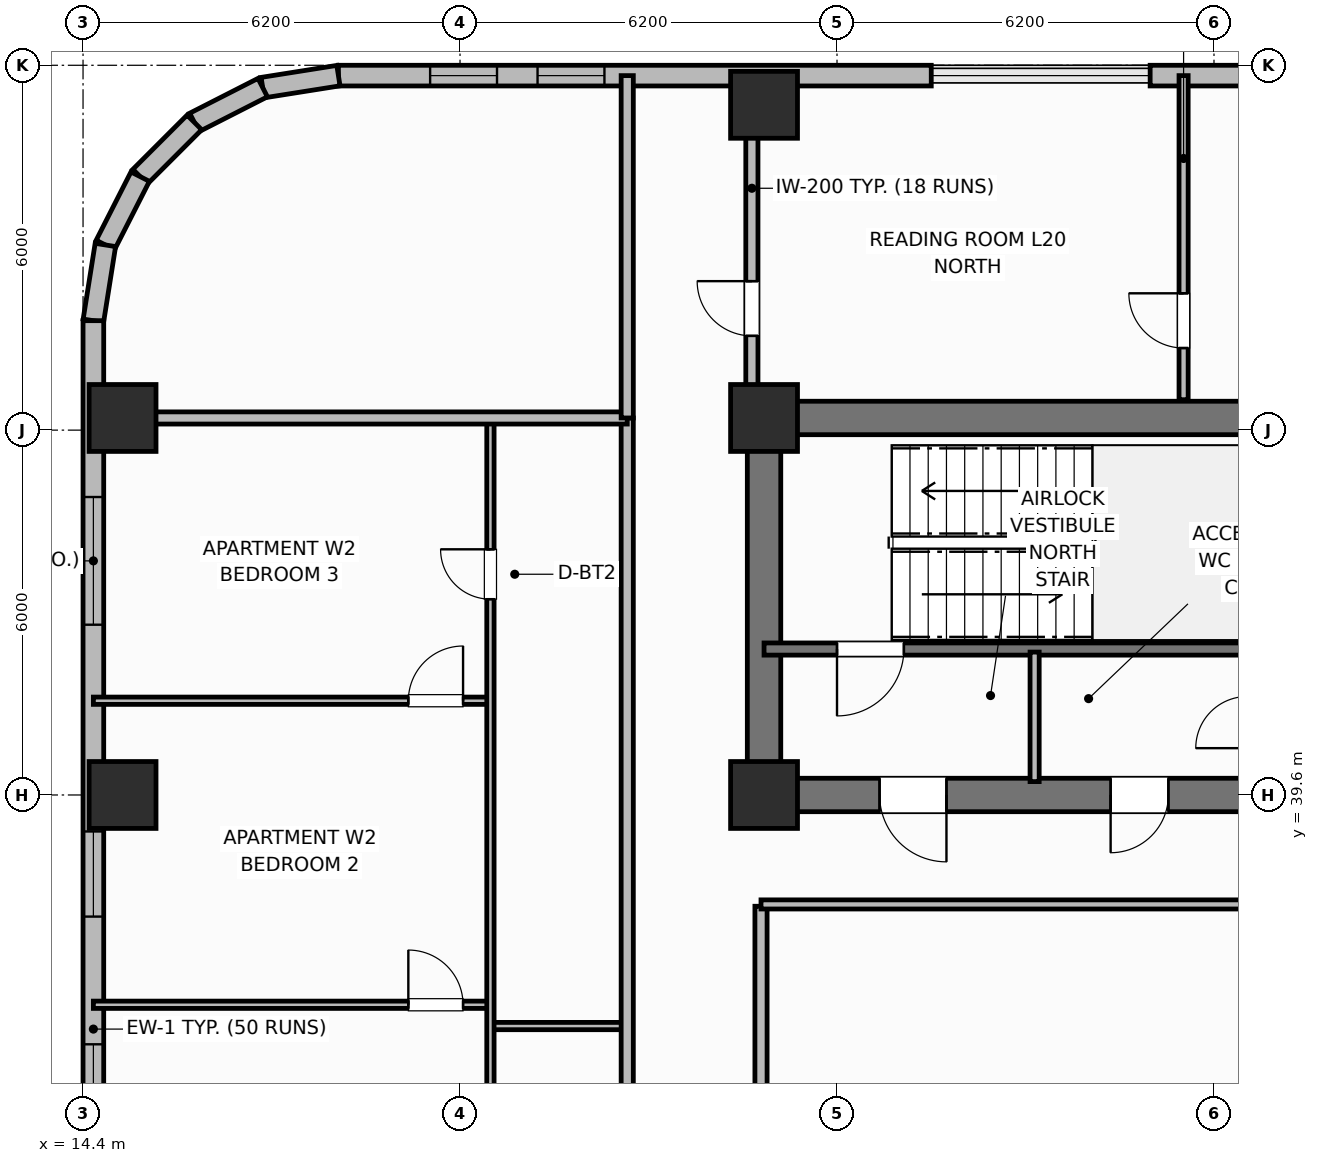
"""IFC4 building model, lengths in metres.
Left out: names, types, materials, properties, quantities, classifications, styles, units other than length and angle.
Written with IfcOpenShell. Run it as: python <this file> out.ifc"""

import sys

from ifc_helpers import new_model, si_unit, direction, frame, frame_2d, origin, origin_2d, place, context, subcontext, project, spatial, rectangle, extrude, element, fill, save


model = new_model("IFC4")
c1 = context("Model", 3, precision=1e-05, world=origin(), true_north=direction((0.0, 1.0)))
c2 = subcontext(c1, "Body", "Model", "MODEL_VIEW")
j1 = project(units=[si_unit("LENGTHUNIT", "METRE"), si_unit("PLANEANGLEUNIT", "RADIAN")], contexts=[c1])
p1 = place(None, origin())
s1 = spatial("IfcSite", under=j1, at=p1, CompositionType="ELEMENT")
p2 = place(p1, origin())
s2 = spatial("IfcBuilding", under=s1, at=p2, CompositionType="ELEMENT")
p3 = place(p2, frame((0.0, 0.0, 84.1)))
s3 = spatial("IfcBuildingStorey", under=s2, at=p3, CompositionType="ELEMENT", Elevation=84.1)
p4 = place(p3, frame((25.6, 45.8, 0.0), z_axis=(0.0, 0.0, 1.0), x_axis=(1.0, 0.0, 0.0)))
e1 = element("IfcWall", 1, at=p4, inside=s3, PredefinedType="SHEAR", context=c2, shape_type="SweptSolid", body=[
    extrude(rectangle(XDim=27.2, YDim=0.55, at=frame_2d((13.6, 0.0))), origin(), (0.0, 0.0, 1.0), 4.2),
])
p5 = place(p3, frame((25.6, 39.875, 0.0), z_axis=(0.0, 0.0, 1.0), x_axis=(0.0, 1.0, 0.0)))
e2 = element("IfcWall", 2, at=p5, inside=s3, PredefinedType="SHEAR", context=c2, shape_type="SweptSolid", body=[
    extrude(rectangle(XDim=5.65, YDim=0.55, at=frame_2d((2.825, 0.0))), origin(), (0.0, 0.0, 1.0), 4.2),
])
p6 = place(p3, frame((52.8, 39.6, 0.0), z_axis=(0.0, 0.0, 1.0), x_axis=(-1.0, 0.0, 0.0)))
e3 = element("IfcWall", 3, at=p6, inside=s3, PredefinedType="SHEAR", context=c2, shape_type="SweptSolid", body=[
    extrude(rectangle(XDim=27.2, YDim=0.55, at=frame_2d((13.6, 0.0))), origin(), (0.0, 0.0, 1.0), 4.2),
])
p7 = place(p6, frame((24.2, 0.0, 0.0)))
e4 = element("IfcOpeningElement", 4, at=p7, cuts=e3, PredefinedType="OPENING", context=c2, shape_type="SweptSolid", body=[
    extrude(rectangle(XDim=1.1, YDim=2.15, at=frame_2d((0.55, 1.075))), frame((0.0, 0.285, 0.0), z_axis=(0.0, -1.0, 0.0), x_axis=(1.0, 0.0, 0.0)), (0.0, 0.0, 1.0), 0.57),
])
p8 = place(p6, frame((20.55, 0.0, 0.0)))
e5 = element("IfcOpeningElement", 5, at=p8, cuts=e3, PredefinedType="OPENING", context=c2, shape_type="SweptSolid", body=[
    extrude(rectangle(XDim=0.95, YDim=2.1, at=frame_2d((0.475, 1.05))), frame((0.0, 0.285, 0.0), z_axis=(0.0, -1.0, 0.0), x_axis=(1.0, 0.0, 0.0)), (0.0, 0.0, 1.0), 0.57),
])
p9 = place(p6, frame((15.1, 0.0, 0.0)))
e6 = element("IfcOpeningElement", 6, at=p9, cuts=e3, PredefinedType="OPENING", context=c2, shape_type="SweptSolid", body=[
    extrude(rectangle(XDim=1.2, YDim=2.15, at=frame_2d((0.6, 1.075))), frame((0.0, 0.285, 0.0), z_axis=(0.0, -1.0, 0.0), x_axis=(1.0, 0.0, 0.0)), (0.0, 0.0, 1.0), 0.57),
])
p10 = place(p6, frame((11.3, 0.0, 0.0)))
e7 = element("IfcOpeningElement", 7, at=p10, cuts=e3, PredefinedType="OPENING", context=c2, shape_type="SweptSolid", body=[
    extrude(rectangle(XDim=1.3, YDim=2.2, at=frame_2d((0.65, 1.1))), frame((0.0, 0.285, 0.0), z_axis=(0.0, -1.0, 0.0), x_axis=(1.0, 0.0, 0.0)), (0.0, 0.0, 1.0), 0.57),
])
p11 = place(p6, frame((7.25, 0.0, 0.0)))
e8 = element("IfcOpeningElement", 8, at=p11, cuts=e3, PredefinedType="OPENING", context=c2, shape_type="SweptSolid", body=[
    extrude(rectangle(XDim=0.85, YDim=2.1, at=frame_2d((0.425, 1.05))), frame((0.0, 0.285, 0.0), z_axis=(0.0, -1.0, 0.0), x_axis=(1.0, 0.0, 0.0)), (0.0, 0.0, 1.0), 0.57),
])
p12 = place(p6, frame((3.0, 0.0, 0.0)))
e9 = element("IfcOpeningElement", 9, at=p12, cuts=e3, PredefinedType="OPENING", context=c2, shape_type="SweptSolid", body=[
    extrude(rectangle(XDim=0.9, YDim=2.1, at=frame_2d((0.45, 1.05))), frame((0.0, 0.285, 0.0), z_axis=(0.0, -1.0, 0.0), x_axis=(1.0, 0.0, 0.0)), (0.0, 0.0, 1.0), 0.57),
])
for number, where, z_axis, x_axis in (
    (10, (25.6, 39.6, 0.0), (0.0, 0.0, 1.0), (1.0, 0.0, 0.0)),
    (11, (25.6, 45.8, 0.0), (0.0, 0.0, 1.0), (1.0, 0.0, 0.0)),
    (12, (25.6, 50.95, 0.0), (0.0, 0.0, 1.0), (1.0, 0.0, 0.0)),
    (13, (15.05, 39.6, 0.0), (0.0, 0.0, 1.0), (1.0, 0.0, 0.0)),
    (14, (15.05, 45.8, 0.0), (0.0, 0.0, 1.0), (1.0, 0.0, 0.0)),
):
    element("IfcColumn", number, at=place(p3, frame(where, z_axis=z_axis, x_axis=x_axis)), inside=s3, PredefinedType="COLUMN", context=c2, shape_type="SweptSolid", body=[
        extrude(rectangle(XDim=1.1, YDim=1.1, at=origin_2d()), origin(), (0.0, 0.0, 1.0), 4.2),
    ])
p13 = place(p3, frame((36.0, 51.43, 0.0), z_axis=(0.0, 0.0, 1.0), x_axis=(-1.0, 0.0, 0.0)))
e15 = element("IfcWall", 15, at=p13, inside=s3, PredefinedType="SOLIDWALL", context=c2, shape_type="SweptSolid", body=[
    extrude(rectangle(XDim=4.05, YDim=0.34, at=frame_2d((2.025, 0.0))), origin(), (0.0, 0.0, 1.0), 3.2),
])
p14 = place(p3, frame((28.35, 51.43, 0.0), z_axis=(0.0, 0.0, 1.0), x_axis=(-1.0, 0.0, 0.0)))
e16 = element("IfcWall", 16, at=p14, inside=s3, PredefinedType="SOLIDWALL", context=c2, shape_type="SweptSolid", body=[
    extrude(rectangle(XDim=9.75, YDim=0.34, at=frame_2d((4.875, 0.0))), origin(), (0.0, 0.0, 1.0), 3.2),
])
p15 = place(p14, frame((5.375, 0.0, 0.95)))
e17 = element("IfcOpeningElement", 17, at=p15, cuts=e16, PredefinedType="OPENING", context=c2, shape_type="SweptSolid", body=[
    extrude(rectangle(XDim=1.1, YDim=1.65, at=frame_2d((0.55, 0.825))), frame((0.0, 0.18, 0.0), z_axis=(0.0, -1.0, 0.0), x_axis=(1.0, 0.0, 0.0)), (0.0, 0.0, 1.0), 0.36),
])
p16 = place(p14, frame((7.142, 0.0, 0.95)))
e18 = element("IfcOpeningElement", 18, at=p16, cuts=e16, PredefinedType="OPENING", context=c2, shape_type="SweptSolid", body=[
    extrude(rectangle(XDim=1.1, YDim=1.65, at=frame_2d((0.55, 0.825))), frame((0.0, 0.18, 0.0), z_axis=(0.0, -1.0, 0.0), x_axis=(1.0, 0.0, 0.0)), (0.0, 0.0, 1.0), 0.36),
])
p17 = place(p3, frame((18.6, 51.43, 0.0), z_axis=(0.0, 0.0, 1.0), x_axis=(-0.98771582066, -0.156260864002, 0.0)))
e19 = element("IfcWall", 19, at=p17, inside=s3, PredefinedType="SOLIDWALL", context=c2, shape_type="SweptSolid", body=[
    extrude(rectangle(XDim=1.261, YDim=0.34, at=frame_2d((0.63, 0.0))), origin(), (0.0, 0.0, 1.0), 3.2),
])
for number, where, z_axis, x_axis in (
    (20, (17.355, 51.233, 0.0), (0.0, 0.0, 1.0), (-0.891, -0.454, 0.0)),
    (21, (16.231, 50.66, 0.0), (0.0, 0.0, 1.0), (-0.707, -0.707, 0.0)),
    (22, (15.34, 49.769, 0.0), (0.0, 0.0, 1.0), (-0.454, -0.891, 0.0)),
):
    element("IfcWall", number, at=place(p3, frame(where, z_axis=z_axis, x_axis=x_axis)), inside=s3, PredefinedType="SOLIDWALL", context=c2, shape_type="SweptSolid", body=[
        extrude(rectangle(XDim=1.261, YDim=0.34, at=frame_2d((0.63, 0.0))), origin(), (0.0, 0.0, 1.0), 3.2),
    ])
p18 = place(p3, frame((14.767, 48.645, 0.0), z_axis=(0.0, 0.0, 1.0), x_axis=(-0.156260864002, -0.98771582066, 0.0)))
e23 = element("IfcWall", 23, at=p18, inside=s3, PredefinedType="SOLIDWALL", context=c2, shape_type="SweptSolid", body=[
    extrude(rectangle(XDim=1.261, YDim=0.34, at=frame_2d((0.63, 0.0))), origin(), (0.0, 0.0, 1.0), 3.2),
])
p19 = place(p3, frame((14.57, 47.4, 0.0), z_axis=(0.0, 0.0, 1.0), x_axis=(0.0, -1.0, 0.0)))
e24 = element("IfcWall", 24, at=p19, inside=s3, PredefinedType="SOLIDWALL", context=c2, shape_type="SweptSolid", body=[
    extrude(rectangle(XDim=14.8, YDim=0.34, at=frame_2d((7.4, 0.0))), origin(), (0.0, 0.0, 1.0), 3.2),
])
p20 = place(p19, frame((2.9, 0.0, 0.8)))
e25 = element("IfcOpeningElement", 25, at=p20, cuts=e24, PredefinedType="OPENING", context=c2, shape_type="SweptSolid", body=[
    extrude(rectangle(XDim=2.1, YDim=1.9, at=frame_2d((1.05, 0.95))), frame((0.0, 0.18, 0.0), z_axis=(0.0, -1.0, 0.0), x_axis=(1.0, 0.0, 0.0)), (0.0, 0.0, 1.0), 0.36),
])
p21 = place(p19, frame((8.4, 0.0, 0.85)))
e26 = element("IfcOpeningElement", 26, at=p21, cuts=e24, PredefinedType="OPENING", context=c2, shape_type="SweptSolid", body=[
    extrude(rectangle(XDim=1.4, YDim=1.85, at=frame_2d((0.7, 0.925))), frame((0.0, 0.18, 0.0), z_axis=(0.0, -1.0, 0.0), x_axis=(1.0, 0.0, 0.0)), (0.0, 0.0, 1.0), 0.36),
])
p22 = place(p19, frame((11.9, 0.0, 0.8)))
e27 = element("IfcOpeningElement", 27, at=p22, cuts=e24, PredefinedType="OPENING", context=c2, shape_type="SweptSolid", body=[
    extrude(rectangle(XDim=2.1, YDim=1.9, at=frame_2d((1.05, 0.95))), frame((0.0, 0.18, 0.0), z_axis=(0.0, -1.0, 0.0), x_axis=(1.0, 0.0, 0.0)), (0.0, 0.0, 1.0), 0.36),
])
p23 = place(p3, frame((35.15, 42.0, 0.0), z_axis=(0.0, 0.0, 1.0), x_axis=(-1.0, 0.0, 0.0)))
e28 = element("IfcWall", 28, at=p23, inside=s3, PredefinedType="SHEAR", context=c2, shape_type="SweptSolid", body=[
    extrude(rectangle(XDim=9.55, YDim=0.2, at=frame_2d((4.775, 0.0))), origin(), (0.0, 0.0, 1.0), 4.2),
])
p24 = place(p23, frame((7.25, 0.0, 0.0)))
e29 = element("IfcOpeningElement", 29, at=p24, cuts=e28, PredefinedType="OPENING", context=c2, shape_type="SweptSolid", body=[
    extrude(rectangle(XDim=1.1, YDim=2.15, at=frame_2d((0.55, 1.075))), frame((0.0, 0.11, 0.0), z_axis=(0.0, -1.0, 0.0), x_axis=(1.0, 0.0, 0.0)), (0.0, 0.0, 1.0), 0.22),
])
p25 = place(p3, frame((30.05, 39.82, 0.0), z_axis=(0.0, 0.0, 1.0), x_axis=(0.0, 1.0, 0.0)))
e30 = element("IfcWall", 30, at=p25, inside=s3, PredefinedType="PARTITIONING", context=c2, shape_type="SweptSolid", body=[
    extrude(rectangle(XDim=2.13, YDim=0.15, at=frame_2d((1.065, 0.0))), origin(), (0.0, 0.0, 1.0), 3.03),
])
p26 = place(p3, frame((25.55, 18.63, 0.0), z_axis=(0.0, 0.0, 1.0), x_axis=(0.0, 1.0, 0.0)))
e31 = element("IfcWall", 31, at=p26, inside=s3, PredefinedType="PARTITIONING", context=c2, shape_type="SweptSolid", body=[
    extrude(rectangle(XDim=19.14, YDim=0.2, at=frame_2d((9.57, 0.0))), origin(), (0.0, 0.0, 1.0), 3.03),
])
p27 = place(p3, frame((25.55, 37.8, 0.0), z_axis=(0.0, 0.0, 1.0), x_axis=(1.0, 0.0, 0.0)))
e32 = element("IfcWall", 32, at=p27, inside=s3, PredefinedType="PARTITIONING", context=c2, shape_type="SweptSolid", body=[
    extrude(rectangle(XDim=12.5, YDim=0.15, at=frame_2d((6.25, 0.0))), origin(), (0.0, 0.0, 1.0), 3.03),
])
p28 = place(p3, frame((21.1, 35.8, 0.0), z_axis=(0.0, 0.0, 1.0), x_axis=(1.0, 0.0, 0.0)))
e33 = element("IfcWall", 33, at=p28, inside=s3, PredefinedType="PARTITIONING", context=c2, shape_type="SweptSolid", body=[
    extrude(rectangle(XDim=2.25, YDim=0.12, at=frame_2d((1.125, 0.0))), origin(), (0.0, 0.0, 1.0), 3.03),
])
p29 = place(p3, frame((14.57, 36.15, 0.0), z_axis=(0.0, 0.0, 1.0), x_axis=(1.0, 0.0, 0.0)))
e34 = element("IfcWall", 34, at=p29, inside=s3, PredefinedType="PARTITIONING", context=c2, shape_type="SweptSolid", body=[
    extrude(rectangle(XDim=6.53, YDim=0.12, at=frame_2d((3.265, 0.0))), origin(), (0.0, 0.0, 1.0), 3.03),
])
p30 = place(p29, frame((5.18, 0.0, 0.0)))
e35 = element("IfcOpeningElement", 35, at=p30, cuts=e34, PredefinedType="OPENING", context=c2, shape_type="SweptSolid", body=[
    extrude(rectangle(XDim=0.9, YDim=2.1, at=frame_2d((0.45, 1.05))), frame((0.0, 0.07, 0.0), z_axis=(0.0, -1.0, 0.0), x_axis=(1.0, 0.0, 0.0)), (0.0, 0.0, 1.0), 0.14),
])
p31 = place(p3, frame((14.57, 41.15, 0.0), z_axis=(0.0, 0.0, 1.0), x_axis=(1.0, 0.0, 0.0)))
e36 = element("IfcWall", 36, at=p31, inside=s3, PredefinedType="PARTITIONING", context=c2, shape_type="SweptSolid", body=[
    extrude(rectangle(XDim=6.53, YDim=0.12, at=frame_2d((3.265, 0.0))), origin(), (0.0, 0.0, 1.0), 3.03),
])
p32 = place(p31, frame((5.18, 0.0, 0.0)))
e37 = element("IfcOpeningElement", 37, at=p32, cuts=e36, PredefinedType="OPENING", context=c2, shape_type="SweptSolid", body=[
    extrude(rectangle(XDim=0.9, YDim=2.1, at=frame_2d((0.45, 1.05))), frame((0.0, 0.07, 0.0), z_axis=(0.0, -1.0, 0.0), x_axis=(1.0, 0.0, 0.0)), (0.0, 0.0, 1.0), 0.14),
])
p33 = place(p3, frame((21.1, 26.64, 0.0), z_axis=(0.0, 0.0, 1.0), x_axis=(0.0, 1.0, 0.0)))
e38 = element("IfcWall", 38, at=p33, inside=s3, PredefinedType="PARTITIONING", context=c2, shape_type="SweptSolid", body=[
    extrude(rectangle(XDim=19.12, YDim=0.12, at=frame_2d((9.56, 0.0))), origin(), (0.0, 0.0, 1.0), 3.03),
])
p34 = place(p33, frame((2.81, 0.0, 0.0)))
e39 = element("IfcOpeningElement", 39, at=p34, cuts=e38, PredefinedType="OPENING", context=c2, shape_type="SweptSolid", body=[
    extrude(rectangle(XDim=0.9, YDim=2.1, at=frame_2d((0.45, 1.05))), frame((0.0, 0.07, 0.0), z_axis=(0.0, -1.0, 0.0), x_axis=(1.0, 0.0, 0.0)), (0.0, 0.0, 1.0), 0.14),
])
p35 = place(p33, frame((16.18, 0.0, 0.0)))
e40 = element("IfcOpeningElement", 40, at=p35, cuts=e38, PredefinedType="OPENING", context=c2, shape_type="SweptSolid", body=[
    extrude(rectangle(XDim=0.82, YDim=2.08, at=frame_2d((0.41, 1.04))), frame((0.0, 0.07, 0.0), z_axis=(0.0, -1.0, 0.0), x_axis=(1.0, 0.0, 0.0)), (0.0, 0.0, 1.0), 0.14),
])
p36 = place(p3, frame((23.35, 10.6, 0.0), z_axis=(0.0, 0.0, 1.0), x_axis=(0.0, 1.0, 0.0)))
e41 = element("IfcWall", 41, at=p36, inside=s3, PredefinedType="PARTITIONING", context=c2, shape_type="SweptSolid", body=[
    extrude(rectangle(XDim=35.2, YDim=0.2, at=frame_2d((17.6, 0.0))), origin(), (0.0, 0.0, 1.0), 3.03),
])
p37 = place(p36, frame((2.65, 0.0, 0.0)))
e42 = element("IfcOpeningElement", 42, at=p37, cuts=e41, PredefinedType="OPENING", context=c2, shape_type="SweptSolid", body=[
    extrude(rectangle(XDim=1.0, YDim=2.15, at=frame_2d((0.5, 1.075))), frame((0.0, 0.11, 0.0), z_axis=(0.0, -1.0, 0.0), x_axis=(1.0, 0.0, 0.0)), (0.0, 0.0, 1.0), 0.22),
])
p38 = place(p36, frame((19.95, 0.0, 0.0)))
e43 = element("IfcOpeningElement", 43, at=p38, cuts=e41, PredefinedType="OPENING", context=c2, shape_type="SweptSolid", body=[
    extrude(rectangle(XDim=1.0, YDim=2.15, at=frame_2d((0.5, 1.075))), frame((0.0, 0.11, 0.0), z_axis=(0.0, -1.0, 0.0), x_axis=(1.0, 0.0, 0.0)), (0.0, 0.0, 1.0), 0.22),
])
p39 = place(p3, frame((14.99, 45.8, 0.0), z_axis=(0.0, 0.0, 1.0), x_axis=(1.0, 0.0, 0.0)))
e44 = element("IfcWall", 44, at=p39, inside=s3, PredefinedType="PARTITIONING", context=c2, shape_type="SweptSolid", body=[
    extrude(rectangle(XDim=8.36, YDim=0.2, at=frame_2d((4.18, 0.0))), origin(), (0.0, 0.0, 1.0), 3.03),
])
p40 = place(p3, frame((23.35, 45.8, 0.0), z_axis=(0.0, 0.0, 1.0), x_axis=(0.0, 1.0, 0.0)))
e45 = element("IfcWall", 45, at=p40, inside=s3, PredefinedType="PARTITIONING", context=c2, shape_type="SweptSolid", body=[
    extrude(rectangle(XDim=5.63, YDim=0.2, at=frame_2d((2.815, 0.0))), origin(), (0.0, 0.0, 1.0), 3.03),
])
p41 = place(p3, frame((32.5, 46.1, 0.0), z_axis=(0.0, 0.0, 1.0), x_axis=(0.0, 1.0, 0.0)))
e46 = element("IfcWall", 46, at=p41, inside=s3, PredefinedType="PARTITIONING", context=c2, shape_type="SweptSolid", body=[
    extrude(rectangle(XDim=5.33, YDim=0.15, at=frame_2d((2.665, 0.0))), origin(), (0.0, 0.0, 1.0), 3.03),
])
p42 = place(p41, frame((0.85, 0.0, 0.0)))
e47 = element("IfcOpeningElement", 47, at=p42, cuts=e46, PredefinedType="OPENING", context=c2, shape_type="SweptSolid", body=[
    extrude(rectangle(XDim=0.9, YDim=2.1, at=frame_2d((0.45, 1.05))), frame((0.0, 0.085, 0.0), z_axis=(0.0, -1.0, 0.0), x_axis=(1.0, 0.0, 0.0)), (0.0, 0.0, 1.0), 0.17),
])
p43 = place(p3, frame((25.4, 46.1, 0.0), z_axis=(0.0, 0.0, 1.0), x_axis=(0.0, 1.0, 0.0)))
e48 = element("IfcWall", 48, at=p43, inside=s3, PredefinedType="PARTITIONING", context=c2, shape_type="SweptSolid", body=[
    extrude(rectangle(XDim=4.78, YDim=0.2, at=frame_2d((2.39, 0.0))), origin(), (0.0, 0.0, 1.0), 3.03),
])
p44 = place(p43, frame((1.05, 0.0, 0.0)))
e49 = element("IfcOpeningElement", 49, at=p44, cuts=e48, PredefinedType="OPENING", context=c2, shape_type="SweptSolid", body=[
    extrude(rectangle(XDim=0.9, YDim=2.1, at=frame_2d((0.45, 1.05))), frame((0.0, 0.11, 0.0), z_axis=(0.0, -1.0, 0.0), x_axis=(1.0, 0.0, 0.0)), (0.0, 0.0, 1.0), 0.22),
])
p45 = place(p15, origin())
e50 = element("IfcWindow", 50, at=p45, inside=s3, PartitioningType="SINGLE_PANEL", PredefinedType="WINDOW", context=c2, shape_type="SweptSolid", body=[
    extrude(rectangle(XDim=1.1, YDim=1.65, at=frame_2d((0.55, 0.825))), frame((0.0, 0.03, 0.0), z_axis=(0.0, -1.0, 0.0), x_axis=(1.0, 0.0, 0.0)), (0.0, 0.0, 1.0), 0.06),
])
fill(e17, e50)
p46 = place(p16, origin())
e51 = element("IfcWindow", 51, at=p46, inside=s3, PartitioningType="SINGLE_PANEL", PredefinedType="WINDOW", context=c2, shape_type="SweptSolid", body=[
    extrude(rectangle(XDim=1.1, YDim=1.65, at=frame_2d((0.55, 0.825))), frame((0.0, 0.03, 0.0), z_axis=(0.0, -1.0, 0.0), x_axis=(1.0, 0.0, 0.0)), (0.0, 0.0, 1.0), 0.06),
])
fill(e18, e51)
p47 = place(p20, origin())
e52 = element("IfcWindow", 52, at=p47, inside=s3, PartitioningType="SINGLE_PANEL", PredefinedType="WINDOW", context=c2, shape_type="SweptSolid", body=[
    extrude(rectangle(XDim=2.1, YDim=1.9, at=frame_2d((1.05, 0.95))), frame((0.0, 0.03, 0.0), z_axis=(0.0, -1.0, 0.0), x_axis=(1.0, 0.0, 0.0)), (0.0, 0.0, 1.0), 0.06),
])
fill(e25, e52)
p48 = place(p21, origin())
e53 = element("IfcWindow", 53, at=p48, inside=s3, PartitioningType="SINGLE_PANEL", PredefinedType="WINDOW", context=c2, shape_type="SweptSolid", body=[
    extrude(rectangle(XDim=1.4, YDim=1.85, at=frame_2d((0.7, 0.925))), frame((0.0, 0.03, 0.0), z_axis=(0.0, -1.0, 0.0), x_axis=(1.0, 0.0, 0.0)), (0.0, 0.0, 1.0), 0.06),
])
fill(e26, e53)
p49 = place(p22, origin())
e54 = element("IfcWindow", 54, at=p49, inside=s3, PartitioningType="SINGLE_PANEL", PredefinedType="WINDOW", context=c2, shape_type="SweptSolid", body=[
    extrude(rectangle(XDim=2.1, YDim=1.9, at=frame_2d((1.05, 0.95))), frame((0.0, 0.03, 0.0), z_axis=(0.0, -1.0, 0.0), x_axis=(1.0, 0.0, 0.0)), (0.0, 0.0, 1.0), 0.06),
])
fill(e27, e54)
p50 = place(p24, origin())
e55 = element("IfcDoor", 55, at=p50, inside=s3, OperationType="SINGLE_SWING_RIGHT", PredefinedType="DOOR", context=c2, shape_type="SweptSolid", body=[
    extrude(rectangle(XDim=1.1, YDim=2.15, at=frame_2d((0.55, 1.075))), frame((0.0, 0.025, 0.0), z_axis=(0.0, -1.0, 0.0), x_axis=(1.0, 0.0, 0.0)), (0.0, 0.0, 1.0), 0.05),
])
fill(e29, e55)
p51 = place(p30, origin())
e56 = element("IfcDoor", 56, at=p51, inside=s3, OperationType="SINGLE_SWING_LEFT", PredefinedType="DOOR", context=c2, shape_type="SweptSolid", body=[
    extrude(rectangle(XDim=0.9, YDim=2.1, at=frame_2d((0.45, 1.05))), frame((0.0, 0.025, 0.0), z_axis=(0.0, -1.0, 0.0), x_axis=(1.0, 0.0, 0.0)), (0.0, 0.0, 1.0), 0.05),
])
fill(e35, e56)
p52 = place(p32, origin())
e57 = element("IfcDoor", 57, at=p52, inside=s3, OperationType="SINGLE_SWING_RIGHT", PredefinedType="DOOR", context=c2, shape_type="SweptSolid", body=[
    extrude(rectangle(XDim=0.9, YDim=2.1, at=frame_2d((0.45, 1.05))), frame((0.0, 0.025, 0.0), z_axis=(0.0, -1.0, 0.0), x_axis=(1.0, 0.0, 0.0)), (0.0, 0.0, 1.0), 0.05),
])
fill(e37, e57)
p53 = place(p35, origin())
e58 = element("IfcDoor", 58, at=p53, inside=s3, OperationType="SINGLE_SWING_RIGHT", PredefinedType="DOOR", context=c2, shape_type="SweptSolid", body=[
    extrude(rectangle(XDim=0.82, YDim=2.08, at=frame_2d((0.41, 1.04))), frame((0.0, 0.025, 0.0), z_axis=(0.0, -1.0, 0.0), x_axis=(1.0, 0.0, 0.0)), (0.0, 0.0, 1.0), 0.05),
])
fill(e40, e58)
p54 = place(p42, origin())
e59 = element("IfcDoor", 59, at=p54, inside=s3, OperationType="SINGLE_SWING_RIGHT", PredefinedType="DOOR", context=c2, shape_type="SweptSolid", body=[
    extrude(rectangle(XDim=0.9, YDim=2.1, at=frame_2d((0.45, 1.05))), frame((0.0, 0.025, 0.0), z_axis=(0.0, -1.0, 0.0), x_axis=(1.0, 0.0, 0.0)), (0.0, 0.0, 1.0), 0.05),
])
fill(e47, e59)
p55 = place(p44, origin())
e60 = element("IfcDoor", 60, at=p55, inside=s3, OperationType="SINGLE_SWING_RIGHT", PredefinedType="DOOR", context=c2, shape_type="SweptSolid", body=[
    extrude(rectangle(XDim=0.9, YDim=2.1, at=frame_2d((0.45, 1.05))), frame((0.0, 0.025, 0.0), z_axis=(0.0, -1.0, 0.0), x_axis=(1.0, 0.0, 0.0)), (0.0, 0.0, 1.0), 0.05),
])
fill(e49, e60)
p56 = place(p7, origin())
e61 = element("IfcDoor", 61, at=p56, inside=s3, OperationType="SINGLE_SWING_LEFT", PredefinedType="DOOR", context=c2, shape_type="SweptSolid", body=[
    extrude(rectangle(XDim=1.1, YDim=2.15, at=frame_2d((0.55, 1.075))), frame((0.0, 0.025, 0.0), z_axis=(0.0, -1.0, 0.0), x_axis=(1.0, 0.0, 0.0)), (0.0, 0.0, 1.0), 0.05),
])
fill(e4, e61)
p57 = place(p8, origin())
e62 = element("IfcDoor", 62, at=p57, inside=s3, OperationType="SINGLE_SWING_RIGHT", PredefinedType="DOOR", context=c2, shape_type="SweptSolid", body=[
    extrude(rectangle(XDim=0.95, YDim=2.1, at=frame_2d((0.475, 1.05))), frame((0.0, 0.025, 0.0), z_axis=(0.0, -1.0, 0.0), x_axis=(1.0, 0.0, 0.0)), (0.0, 0.0, 1.0), 0.05),
])
fill(e5, e62)
save(model, sys.argv[1])
